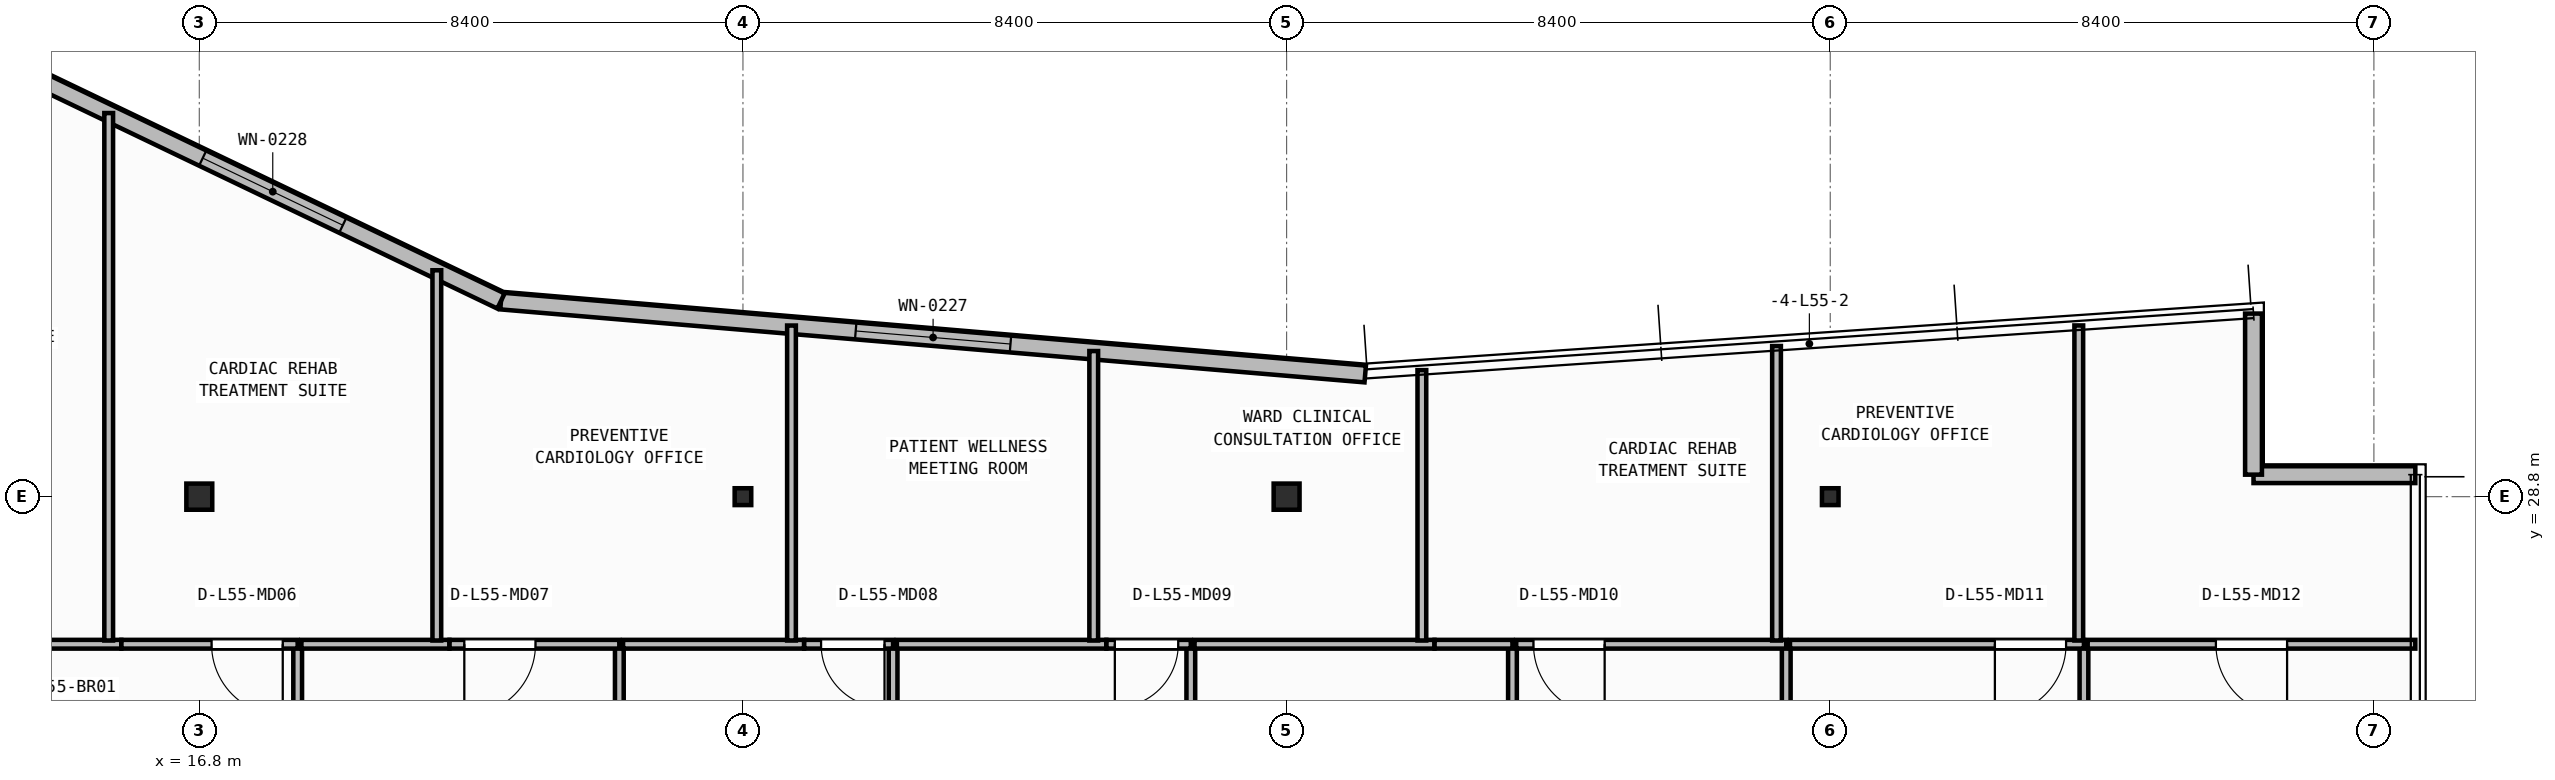
"""IFC4 building model, lengths in metres.
Left out: names, types, materials, properties, quantities, classifications, styles, units other than length and angle.
Written with IfcOpenShell. Run it as: python <this file> out.ifc"""

import sys

from ifc_helpers import new_model, si_unit, direction, frame, frame_2d, origin, origin_2d, place, context, subcontext, project, spatial, rectangle, i_section, extrude, element, fill, save


model = new_model("IFC4")
c1 = context("Model", 3, precision=1e-05, world=origin(), true_north=direction((0.0, 1.0)))
c2 = subcontext(c1, "Body", "Model", "MODEL_VIEW")
j1 = project(units=[si_unit("LENGTHUNIT", "METRE"), si_unit("PLANEANGLEUNIT", "RADIAN")], contexts=[c1])
p1 = place(None, origin())
s1 = spatial("IfcSite", under=j1, at=p1, CompositionType="ELEMENT")
p2 = place(p1, origin())
s2 = spatial("IfcBuilding", under=s1, at=p2, CompositionType="ELEMENT")
p3 = place(p2, frame((0.0, 0.0, 223.7)))
s3 = spatial("IfcBuildingStorey", under=s2, at=p3, CompositionType="ELEMENT", Elevation=223.7)
p4 = place(p3, frame((16.8, 28.8, 0.0), z_axis=(0.0, 0.0, 1.0), x_axis=(1.0, 0.0, 0.0)))
e1 = element("IfcColumn", 1, at=p4, inside=s3, PredefinedType="COLUMN", context=c2, shape_type="SweptSolid", body=[
    extrude(i_section(OverallWidth=0.4, OverallDepth=0.404, WebThickness=0.02, FlangeThickness=0.032, at=origin_2d()), origin(), (0.0, 0.0, 1.0), 3.95),
])
p5 = place(p3, frame((25.2, 28.8, 0.0), z_axis=(0.0, 0.0, 1.0), x_axis=(1.0, 0.0, 0.0)))
e2 = element("IfcColumn", 2, at=p5, inside=s3, PredefinedType="COLUMN", context=c2, shape_type="SweptSolid", body=[
    extrude(i_section(OverallWidth=0.256, OverallDepth=0.26, WebThickness=0.01, FlangeThickness=0.017, FilletRadius=0.013, at=origin_2d()), origin(), (0.0, 0.0, 1.0), 3.95),
])
p6 = place(p3, frame((33.6, 28.8, 0.0), z_axis=(0.0, 0.0, 1.0), x_axis=(1.0, 0.0, 0.0)))
e3 = element("IfcColumn", 3, at=p6, inside=s3, PredefinedType="COLUMN", context=c2, shape_type="SweptSolid", body=[
    extrude(i_section(OverallWidth=0.4, OverallDepth=0.404, WebThickness=0.02, FlangeThickness=0.032, at=origin_2d()), origin(), (0.0, 0.0, 1.0), 3.95),
])
p7 = place(p3, frame((42.0, 28.8, 0.0), z_axis=(0.0, 0.0, 1.0), x_axis=(1.0, 0.0, 0.0)))
e4 = element("IfcColumn", 4, at=p7, inside=s3, PredefinedType="COLUMN", context=c2, shape_type="SweptSolid", body=[
    extrude(i_section(OverallWidth=0.256, OverallDepth=0.26, WebThickness=0.01, FlangeThickness=0.017, FilletRadius=0.013, at=origin_2d()), origin(), (0.0, 0.0, 1.0), 3.95),
])
p8 = place(p3, frame((51.04, 29.14, 0.0), z_axis=(0.0, 0.0, 1.0), x_axis=(-1.0, 0.0, 0.0)))
e5 = element("IfcWall", 5, at=p8, inside=s3, PredefinedType="STANDARD", context=c2, shape_type="SweptSolid", body=[
    extrude(rectangle(XDim=2.5, YDim=0.26, at=frame_2d((1.25, 0.0))), origin(), (0.0, 0.0, 1.0), 3.71),
])
p9 = place(p3, frame((48.54, 29.14, 0.0), z_axis=(0.0, 0.0, 1.0), x_axis=(0.0, 1.0, 0.0)))
e6 = element("IfcWall", 6, at=p9, inside=s3, PredefinedType="STANDARD", context=c2, shape_type="SweptSolid", body=[
    extrude(rectangle(XDim=2.489, YDim=0.26, at=frame_2d((1.245, 0.0))), origin(), (0.0, 0.0, 1.0), 3.71),
])
p10 = place(p3, frame((34.815, 30.696, 0.0), z_axis=(0.0, 0.0, 1.0), x_axis=(-0.996454704935, 0.084130975344, 0.0)))
e7 = element("IfcWall", 7, at=p10, inside=s3, PredefinedType="STANDARD", context=c2, shape_type="SweptSolid", body=[
    extrude(rectangle(XDim=13.401, YDim=0.26, at=frame_2d((6.701, 0.0))), origin(), (0.0, 0.0, 1.0), 3.71),
])
p11 = place(p10, frame((5.5, 0.0, 0.9)))
e8 = element("IfcOpeningElement", 8, at=p11, cuts=e7, PredefinedType="OPENING", context=c2, shape_type="SweptSolid", body=[
    extrude(rectangle(XDim=2.4, YDim=1.65, at=frame_2d((1.2, 0.825))), frame((0.0, 0.14, 0.0), z_axis=(0.0, -1.0, 0.0), x_axis=(1.0, 0.0, 0.0)), (0.0, 0.0, 1.0), 0.28),
])
p12 = place(p3, frame((21.461, 31.823, 0.0), z_axis=(0.0, 0.0, 1.0), x_axis=(-0.901858094827, 0.432032379336, 0.0)))
e9 = element("IfcWall", 9, at=p12, inside=s3, PredefinedType="STANDARD", context=c2, shape_type="SweptSolid", body=[
    extrude(rectangle(XDim=12.532, YDim=0.26, at=frame_2d((6.266, 0.0))), origin(), (0.0, 0.0, 1.0), 3.71),
])
p13 = place(p12, frame((2.71, 0.0, 0.9)))
e10 = element("IfcOpeningElement", 10, at=p13, cuts=e9, PredefinedType="OPENING", context=c2, shape_type="SweptSolid", body=[
    extrude(rectangle(XDim=2.4, YDim=1.65, at=frame_2d((1.2, 0.825))), frame((0.0, 0.14, 0.0), z_axis=(0.0, -1.0, 0.0), x_axis=(1.0, 0.0, 0.0)), (0.0, 0.0, 1.0), 0.28),
])
p14 = place(p3, frame((18.32, 23.012, 0.0), z_axis=(0.0, 0.0, 1.0), x_axis=(0.0, 1.0, 0.0)))
e11 = element("IfcWall", 11, at=p14, inside=s3, PredefinedType="PARTITIONING", context=c2, shape_type="SweptSolid", body=[
    extrude(rectangle(XDim=3.508, YDim=0.135, at=frame_2d((1.754, 0.0))), origin(), (0.0, 0.0, 1.0), 3.71),
])
p15 = place(p3, frame((15.594, 26.52, 0.0), z_axis=(0.0, 0.0, 1.0), x_axis=(-1.0, 0.0, 0.0)))
e12 = element("IfcWall", 12, at=p15, inside=s3, PredefinedType="PARTITIONING", context=c2, shape_type="SweptSolid", body=[
    extrude(rectangle(XDim=1.814, YDim=0.135, at=frame_2d((0.907, 0.0))), origin(), (0.0, 0.0, 1.0), 3.71),
])
p16 = place(p3, frame((18.32, 26.52, 0.0), z_axis=(0.0, 0.0, 1.0), x_axis=(-1.0, 0.0, 0.0)))
e13 = element("IfcWall", 13, at=p16, inside=s3, PredefinedType="PARTITIONING", context=c2, shape_type="SweptSolid", body=[
    extrude(rectangle(XDim=2.723, YDim=0.135, at=frame_2d((1.362, 0.0))), origin(), (0.0, 0.0, 1.0), 3.71),
])
p17 = place(p16, frame((0.231, 0.0, 0.0)))
e14 = element("IfcOpeningElement", 14, at=p17, cuts=e13, PredefinedType="OPENING", context=c2, shape_type="SweptSolid", body=[
    extrude(rectangle(XDim=1.1, YDim=2.1, at=frame_2d((0.55, 1.05))), frame((0.0, 0.077, 0.0), z_axis=(0.0, -1.0, 0.0), x_axis=(1.0, 0.0, 0.0)), (0.0, 0.0, 1.0), 0.155),
])
p18 = place(p3, frame((23.29, 23.012, 0.0), z_axis=(0.0, 0.0, 1.0), x_axis=(0.0, 1.0, 0.0)))
e15 = element("IfcWall", 15, at=p18, inside=s3, PredefinedType="PARTITIONING", context=c2, shape_type="SweptSolid", body=[
    extrude(rectangle(XDim=3.508, YDim=0.135, at=frame_2d((1.754, 0.0))), origin(), (0.0, 0.0, 1.0), 3.71),
])
p19 = place(p3, frame((20.665, 26.52, 0.0), z_axis=(0.0, 0.0, 1.0), x_axis=(-1.0, 0.0, 0.0)))
e16 = element("IfcWall", 16, at=p19, inside=s3, PredefinedType="PARTITIONING", context=c2, shape_type="SweptSolid", body=[
    extrude(rectangle(XDim=2.287, YDim=0.135, at=frame_2d((1.144, 0.0))), origin(), (0.0, 0.0, 1.0), 3.71),
])
p20 = place(p3, frame((23.29, 26.52, 0.0), z_axis=(0.0, 0.0, 1.0), x_axis=(-1.0, 0.0, 0.0)))
e17 = element("IfcWall", 17, at=p20, inside=s3, PredefinedType="PARTITIONING", context=c2, shape_type="SweptSolid", body=[
    extrude(rectangle(XDim=2.624, YDim=0.135, at=frame_2d((1.312, 0.0))), origin(), (0.0, 0.0, 1.0), 3.71),
])
p21 = place(p20, frame((1.295, 0.0, 0.0)))
e18 = element("IfcOpeningElement", 18, at=p21, cuts=e17, PredefinedType="OPENING", context=c2, shape_type="SweptSolid", body=[
    extrude(rectangle(XDim=1.1, YDim=2.1, at=frame_2d((0.55, 1.05))), frame((0.0, 0.077, 0.0), z_axis=(0.0, -1.0, 0.0), x_axis=(1.0, 0.0, 0.0)), (0.0, 0.0, 1.0), 0.155),
])
p22 = place(p3, frame((27.52, 23.012, 0.0), z_axis=(0.0, 0.0, 1.0), x_axis=(0.0, 1.0, 0.0)))
e19 = element("IfcWall", 19, at=p22, inside=s3, PredefinedType="PARTITIONING", context=c2, shape_type="SweptSolid", body=[
    extrude(rectangle(XDim=3.508, YDim=0.135, at=frame_2d((1.754, 0.0))), origin(), (0.0, 0.0, 1.0), 3.71),
])
p23 = place(p3, frame((26.145, 26.52, 0.0), z_axis=(0.0, 0.0, 1.0), x_axis=(-1.0, 0.0, 0.0)))
e20 = element("IfcWall", 20, at=p23, inside=s3, PredefinedType="PARTITIONING", context=c2, shape_type="SweptSolid", body=[
    extrude(rectangle(XDim=2.797, YDim=0.135, at=frame_2d((1.398, 0.0))), origin(), (0.0, 0.0, 1.0), 3.71),
])
p24 = place(p3, frame((27.52, 26.52, 0.0), z_axis=(0.0, 0.0, 1.0), x_axis=(-1.0, 0.0, 0.0)))
e21 = element("IfcWall", 21, at=p24, inside=s3, PredefinedType="PARTITIONING", context=c2, shape_type="SweptSolid", body=[
    extrude(rectangle(XDim=1.374, YDim=0.135, at=frame_2d((0.687, 0.0))), origin(), (0.0, 0.0, 1.0), 3.71),
])
p25 = place(p24, frame((0.133, 0.0, 0.0)))
e22 = element("IfcOpeningElement", 22, at=p25, cuts=e21, PredefinedType="OPENING", context=c2, shape_type="SweptSolid", body=[
    extrude(rectangle(XDim=0.98, YDim=2.1, at=frame_2d((0.49, 1.05))), frame((0.0, 0.077, 0.0), z_axis=(0.0, -1.0, 0.0), x_axis=(1.0, 0.0, 0.0)), (0.0, 0.0, 1.0), 0.155),
])
p26 = place(p3, frame((32.12, 23.012, 0.0), z_axis=(0.0, 0.0, 1.0), x_axis=(0.0, 1.0, 0.0)))
e23 = element("IfcWall", 23, at=p26, inside=s3, PredefinedType="PARTITIONING", context=c2, shape_type="SweptSolid", body=[
    extrude(rectangle(XDim=3.508, YDim=0.135, at=frame_2d((1.754, 0.0))), origin(), (0.0, 0.0, 1.0), 3.71),
])
p27 = place(p3, frame((30.815, 26.52, 0.0), z_axis=(0.0, 0.0, 1.0), x_axis=(-1.0, 0.0, 0.0)))
e24 = element("IfcWall", 24, at=p27, inside=s3, PredefinedType="PARTITIONING", context=c2, shape_type="SweptSolid", body=[
    extrude(rectangle(XDim=3.237, YDim=0.135, at=frame_2d((1.619, 0.0))), origin(), (0.0, 0.0, 1.0), 3.71),
])
p28 = place(p3, frame((32.12, 26.52, 0.0), z_axis=(0.0, 0.0, 1.0), x_axis=(-1.0, 0.0, 0.0)))
e25 = element("IfcWall", 25, at=p28, inside=s3, PredefinedType="PARTITIONING", context=c2, shape_type="SweptSolid", body=[
    extrude(rectangle(XDim=1.303, YDim=0.135, at=frame_2d((0.652, 0.0))), origin(), (0.0, 0.0, 1.0), 3.71),
])
p29 = place(p28, frame((0.194, 0.0, 0.0)))
e26 = element("IfcOpeningElement", 26, at=p29, cuts=e25, PredefinedType="OPENING", context=c2, shape_type="SweptSolid", body=[
    extrude(rectangle(XDim=0.98, YDim=2.1, at=frame_2d((0.49, 1.05))), frame((0.0, 0.077, 0.0), z_axis=(0.0, -1.0, 0.0), x_axis=(1.0, 0.0, 0.0)), (0.0, 0.0, 1.0), 0.155),
])
p30 = place(p3, frame((37.09, 23.012, 0.0), z_axis=(0.0, 0.0, 1.0), x_axis=(0.0, 1.0, 0.0)))
e27 = element("IfcWall", 27, at=p30, inside=s3, PredefinedType="PARTITIONING", context=c2, shape_type="SweptSolid", body=[
    extrude(rectangle(XDim=3.508, YDim=0.135, at=frame_2d((1.754, 0.0))), origin(), (0.0, 0.0, 1.0), 3.71),
])
p31 = place(p3, frame((35.885, 26.52, 0.0), z_axis=(0.0, 0.0, 1.0), x_axis=(-1.0, 0.0, 0.0)))
e28 = element("IfcWall", 28, at=p31, inside=s3, PredefinedType="PARTITIONING", context=c2, shape_type="SweptSolid", body=[
    extrude(rectangle(XDim=3.707, YDim=0.135, at=frame_2d((1.854, 0.0))), origin(), (0.0, 0.0, 1.0), 3.71),
])
p32 = place(p3, frame((37.09, 26.52, 0.0), z_axis=(0.0, 0.0, 1.0), x_axis=(-1.0, 0.0, 0.0)))
e29 = element("IfcWall", 29, at=p32, inside=s3, PredefinedType="PARTITIONING", context=c2, shape_type="SweptSolid", body=[
    extrude(rectangle(XDim=1.203, YDim=0.135, at=frame_2d((0.602, 0.0))), origin(), (0.0, 0.0, 1.0), 3.71),
])
p33 = place(p3, frame((41.32, 23.012, 0.0), z_axis=(0.0, 0.0, 1.0), x_axis=(0.0, 1.0, 0.0)))
e30 = element("IfcWall", 30, at=p33, inside=s3, PredefinedType="PARTITIONING", context=c2, shape_type="SweptSolid", body=[
    extrude(rectangle(XDim=3.508, YDim=0.135, at=frame_2d((1.754, 0.0))), origin(), (0.0, 0.0, 1.0), 3.71),
])
p34 = place(p3, frame((41.32, 26.52, 0.0), z_axis=(0.0, 0.0, 1.0), x_axis=(-1.0, 0.0, 0.0)))
e31 = element("IfcWall", 31, at=p34, inside=s3, PredefinedType="PARTITIONING", context=c2, shape_type="SweptSolid", body=[
    extrude(rectangle(XDim=4.173, YDim=0.135, at=frame_2d((2.086, 0.0))), origin(), (0.0, 0.0, 1.0), 3.71),
])
p35 = place(p34, frame((2.806, 0.0, 0.0)))
e32 = element("IfcOpeningElement", 32, at=p35, cuts=e31, PredefinedType="OPENING", context=c2, shape_type="SweptSolid", body=[
    extrude(rectangle(XDim=1.1, YDim=2.1, at=frame_2d((0.55, 1.05))), frame((0.0, 0.077, 0.0), z_axis=(0.0, -1.0, 0.0), x_axis=(1.0, 0.0, 0.0)), (0.0, 0.0, 1.0), 0.155),
])
p36 = place(p3, frame((45.92, 23.012, 0.0), z_axis=(0.0, 0.0, 1.0), x_axis=(0.0, 1.0, 0.0)))
e33 = element("IfcWall", 33, at=p36, inside=s3, PredefinedType="PARTITIONING", context=c2, shape_type="SweptSolid", body=[
    extrude(rectangle(XDim=3.508, YDim=0.135, at=frame_2d((1.754, 0.0))), origin(), (0.0, 0.0, 1.0), 3.71),
])
p37 = place(p3, frame((45.92, 26.52, 0.0), z_axis=(0.0, 0.0, 1.0), x_axis=(-1.0, 0.0, 0.0)))
e34 = element("IfcWall", 34, at=p37, inside=s3, PredefinedType="PARTITIONING", context=c2, shape_type="SweptSolid", body=[
    extrude(rectangle(XDim=4.542, YDim=0.135, at=frame_2d((2.271, 0.0))), origin(), (0.0, 0.0, 1.0), 3.71),
])
p38 = place(p37, frame((0.276, 0.0, 0.0)))
e35 = element("IfcOpeningElement", 35, at=p38, cuts=e34, PredefinedType="OPENING", context=c2, shape_type="SweptSolid", body=[
    extrude(rectangle(XDim=1.1, YDim=2.1, at=frame_2d((0.55, 1.05))), frame((0.0, 0.077, 0.0), z_axis=(0.0, -1.0, 0.0), x_axis=(1.0, 0.0, 0.0)), (0.0, 0.0, 1.0), 0.155),
])
p39 = place(p3, frame((51.04, 26.52, 0.0), z_axis=(0.0, 0.0, 1.0), x_axis=(-1.0, 0.0, 0.0)))
e36 = element("IfcWall", 36, at=p39, inside=s3, PredefinedType="PARTITIONING", context=c2, shape_type="SweptSolid", body=[
    extrude(rectangle(XDim=5.062, YDim=0.135, at=frame_2d((2.531, 0.0))), origin(), (0.0, 0.0, 1.0), 3.71),
])
p40 = place(p39, frame((1.981, 0.0, 0.0)))
e37 = element("IfcOpeningElement", 37, at=p40, cuts=e36, PredefinedType="OPENING", context=c2, shape_type="SweptSolid", body=[
    extrude(rectangle(XDim=1.1, YDim=2.1, at=frame_2d((0.55, 1.05))), frame((0.0, 0.077, 0.0), z_axis=(0.0, -1.0, 0.0), x_axis=(1.0, 0.0, 0.0)), (0.0, 0.0, 1.0), 0.155),
])
p41 = place(p3, frame((15.4, 26.577, 0.0), z_axis=(0.0, 0.0, 1.0), x_axis=(0.0, 1.0, 0.0)))
e38 = element("IfcWall", 38, at=p41, inside=s3, PredefinedType="PARTITIONING", context=c2, shape_type="SweptSolid", body=[
    extrude(rectangle(XDim=8.149, YDim=0.135, at=frame_2d((4.075, 0.0))), origin(), (0.0, 0.0, 1.0), 3.71),
])
p42 = place(p3, frame((20.47, 26.577, 0.0), z_axis=(0.0, 0.0, 1.0), x_axis=(0.0, 1.0, 0.0)))
e39 = element("IfcWall", 39, at=p42, inside=s3, PredefinedType="PARTITIONING", context=c2, shape_type="SweptSolid", body=[
    extrude(rectangle(XDim=5.72, YDim=0.135, at=frame_2d((2.86, 0.0))), origin(), (0.0, 0.0, 1.0), 3.71),
])
p43 = place(p3, frame((25.95, 26.577, 0.0), z_axis=(0.0, 0.0, 1.0), x_axis=(0.0, 1.0, 0.0)))
e40 = element("IfcWall", 40, at=p43, inside=s3, PredefinedType="PARTITIONING", context=c2, shape_type="SweptSolid", body=[
    extrude(rectangle(XDim=4.867, YDim=0.135, at=frame_2d((2.433, 0.0))), origin(), (0.0, 0.0, 1.0), 3.71),
])
p44 = place(p3, frame((30.62, 26.577, 0.0), z_axis=(0.0, 0.0, 1.0), x_axis=(0.0, 1.0, 0.0)))
e41 = element("IfcWall", 41, at=p44, inside=s3, PredefinedType="PARTITIONING", context=c2, shape_type="SweptSolid", body=[
    extrude(rectangle(XDim=4.472, YDim=0.135, at=frame_2d((2.236, 0.0))), origin(), (0.0, 0.0, 1.0), 3.71),
])
p45 = place(p3, frame((35.69, 26.577, 0.0), z_axis=(0.0, 0.0, 1.0), x_axis=(0.0, 1.0, 0.0)))
e42 = element("IfcWall", 42, at=p45, inside=s3, PredefinedType="PARTITIONING", context=c2, shape_type="SweptSolid", body=[
    extrude(rectangle(XDim=4.178, YDim=0.135, at=frame_2d((2.089, 0.0))), origin(), (0.0, 0.0, 1.0), 3.71),
])
p46 = place(p3, frame((41.17, 26.577, 0.0), z_axis=(0.0, 0.0, 1.0), x_axis=(0.0, 1.0, 0.0)))
e43 = element("IfcWall", 43, at=p46, inside=s3, PredefinedType="PARTITIONING", context=c2, shape_type="SweptSolid", body=[
    extrude(rectangle(XDim=4.55, YDim=0.135, at=frame_2d((2.275, 0.0))), origin(), (0.0, 0.0, 1.0), 3.71),
])
p47 = place(p3, frame((45.84, 26.577, 0.0), z_axis=(0.0, 0.0, 1.0), x_axis=(0.0, 1.0, 0.0)))
e44 = element("IfcWall", 44, at=p47, inside=s3, PredefinedType="PARTITIONING", context=c2, shape_type="SweptSolid", body=[
    extrude(rectangle(XDim=4.868, YDim=0.135, at=frame_2d((2.434, 0.0))), origin(), (0.0, 0.0, 1.0), 3.71),
])
p48 = place(p11, origin())
e45 = element("IfcWindow", 45, at=p48, inside=s3, PartitioningType="SINGLE_PANEL", PredefinedType="WINDOW", context=c2, shape_type="SweptSolid", body=[
    extrude(rectangle(XDim=2.4, YDim=1.65, at=frame_2d((1.2, 0.825))), frame((0.0, 0.03, 0.0), z_axis=(0.0, -1.0, 0.0), x_axis=(1.0, 0.0, 0.0)), (0.0, 0.0, 1.0), 0.06),
])
fill(e8, e45)
p49 = place(p13, origin())
e46 = element("IfcWindow", 46, at=p49, inside=s3, PartitioningType="SINGLE_PANEL", PredefinedType="WINDOW", context=c2, shape_type="SweptSolid", body=[
    extrude(rectangle(XDim=2.4, YDim=1.65, at=frame_2d((1.2, 0.825))), frame((0.0, 0.03, 0.0), z_axis=(0.0, -1.0, 0.0), x_axis=(1.0, 0.0, 0.0)), (0.0, 0.0, 1.0), 0.06),
])
fill(e10, e46)
p50 = place(p17, origin())
e47 = element("IfcDoor", 47, at=p50, inside=s3, OperationType="SINGLE_SWING_LEFT", PredefinedType="DOOR", context=c2, shape_type="SweptSolid", body=[
    extrude(rectangle(XDim=1.1, YDim=2.1, at=frame_2d((0.55, 1.05))), frame((0.0, 0.025, 0.0), z_axis=(0.0, -1.0, 0.0), x_axis=(1.0, 0.0, 0.0)), (0.0, 0.0, 1.0), 0.05),
])
fill(e14, e47)
p51 = place(p21, origin())
e48 = element("IfcDoor", 48, at=p51, inside=s3, OperationType="SINGLE_SWING_RIGHT", PredefinedType="DOOR", context=c2, shape_type="SweptSolid", body=[
    extrude(rectangle(XDim=1.1, YDim=2.1, at=frame_2d((0.55, 1.05))), frame((0.0, 0.025, 0.0), z_axis=(0.0, -1.0, 0.0), x_axis=(1.0, 0.0, 0.0)), (0.0, 0.0, 1.0), 0.05),
])
fill(e18, e48)
p52 = place(p25, origin())
e49 = element("IfcDoor", 49, at=p52, inside=s3, OperationType="SINGLE_SWING_LEFT", PredefinedType="DOOR", context=c2, shape_type="SweptSolid", body=[
    extrude(rectangle(XDim=0.98, YDim=2.1, at=frame_2d((0.49, 1.05))), frame((0.0, 0.025, 0.0), z_axis=(0.0, -1.0, 0.0), x_axis=(1.0, 0.0, 0.0)), (0.0, 0.0, 1.0), 0.05),
])
fill(e22, e49)
p53 = place(p29, origin())
e50 = element("IfcDoor", 50, at=p53, inside=s3, OperationType="SINGLE_SWING_RIGHT", PredefinedType="DOOR", context=c2, shape_type="SweptSolid", body=[
    extrude(rectangle(XDim=0.98, YDim=2.1, at=frame_2d((0.49, 1.05))), frame((0.0, 0.025, 0.0), z_axis=(0.0, -1.0, 0.0), x_axis=(1.0, 0.0, 0.0)), (0.0, 0.0, 1.0), 0.05),
])
fill(e26, e50)
p54 = place(p35, origin())
e51 = element("IfcDoor", 51, at=p54, inside=s3, OperationType="SINGLE_SWING_LEFT", PredefinedType="DOOR", context=c2, shape_type="SweptSolid", body=[
    extrude(rectangle(XDim=1.1, YDim=2.1, at=frame_2d((0.55, 1.05))), frame((0.0, 0.025, 0.0), z_axis=(0.0, -1.0, 0.0), x_axis=(1.0, 0.0, 0.0)), (0.0, 0.0, 1.0), 0.05),
])
fill(e32, e51)
p55 = place(p38, origin())
e52 = element("IfcDoor", 52, at=p55, inside=s3, OperationType="SINGLE_SWING_RIGHT", PredefinedType="DOOR", context=c2, shape_type="SweptSolid", body=[
    extrude(rectangle(XDim=1.1, YDim=2.1, at=frame_2d((0.55, 1.05))), frame((0.0, 0.025, 0.0), z_axis=(0.0, -1.0, 0.0), x_axis=(1.0, 0.0, 0.0)), (0.0, 0.0, 1.0), 0.05),
])
fill(e35, e52)
p56 = place(p40, origin())
e53 = element("IfcDoor", 53, at=p56, inside=s3, OperationType="SINGLE_SWING_LEFT", PredefinedType="DOOR", context=c2, shape_type="SweptSolid", body=[
    extrude(rectangle(XDim=1.1, YDim=2.1, at=frame_2d((0.55, 1.05))), frame((0.0, 0.025, 0.0), z_axis=(0.0, -1.0, 0.0), x_axis=(1.0, 0.0, 0.0)), (0.0, 0.0, 1.0), 0.05),
])
fill(e37, e53)
save(model, sys.argv[1])
